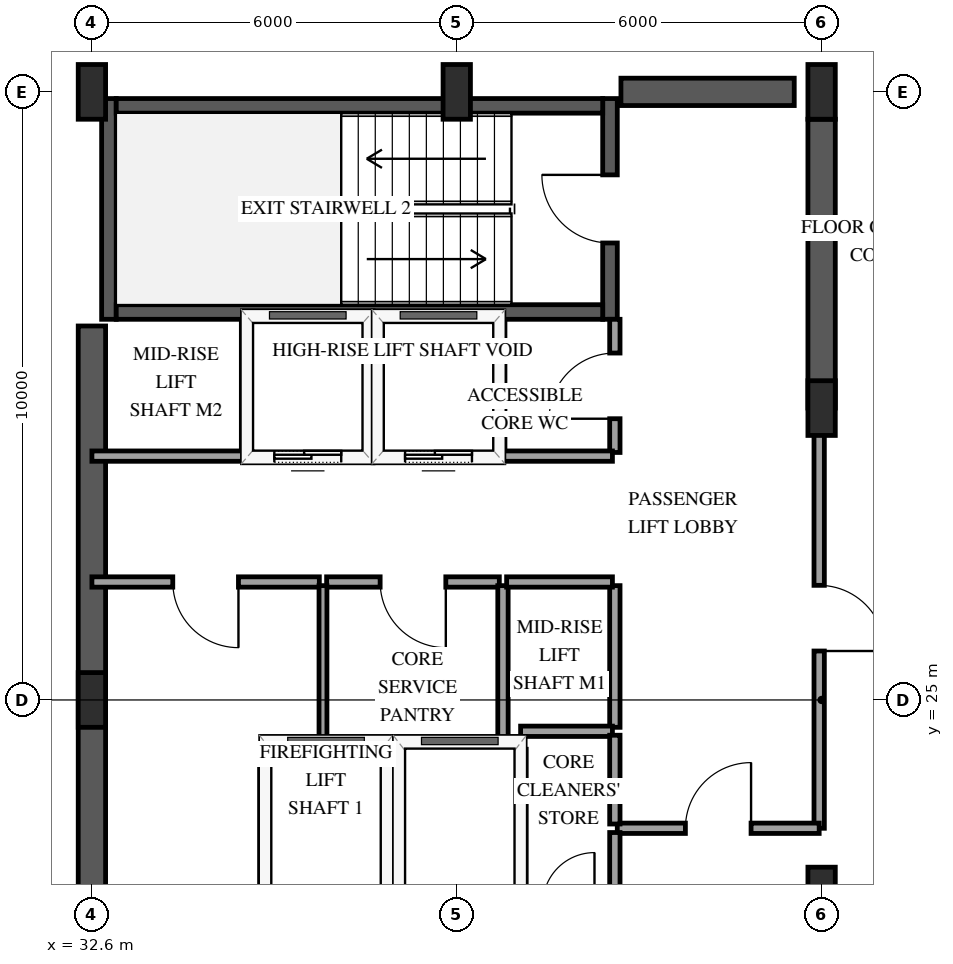
"""IFC4 building model, lengths in metres.
Left out: names, types, materials, properties, quantities, classifications, styles, units other than length and angle.
Written with IfcOpenShell. Run it as: python <this file> out.ifc"""

import sys

from ifc_helpers import new_model, si_unit, direction, frame, frame_2d, origin, origin_2d, place, context, subcontext, project, spatial, rectangle, extrude, element, fill, save


model = new_model("IFC4")
c1 = context("Model", 3, precision=1e-05, world=origin(), true_north=direction((0.0, 1.0)))
c2 = subcontext(c1, "Body", "Model", "MODEL_VIEW")
j1 = project(units=[si_unit("LENGTHUNIT", "METRE"), si_unit("PLANEANGLEUNIT", "RADIAN")], contexts=[c1])
p1 = place(None, origin())
s1 = spatial("IfcSite", under=j1, at=p1, CompositionType="ELEMENT")
p2 = place(p1, origin())
s2 = spatial("IfcBuilding", under=s1, at=p2, CompositionType="ELEMENT")
p3 = place(p2, frame((0.0, 0.0, 242.5)))
s3 = spatial("IfcBuildingStorey", under=s2, at=p3, CompositionType="ELEMENT", Elevation=242.5)
p4 = place(p3, frame((32.88, 31.26, 0.0), z_axis=(0.0, 0.0, 1.0), x_axis=(0.0, 1.0, 0.0)))
e1 = element("IfcWall", 1, at=p4, inside=s3, PredefinedType="SHEAR", context=c2, shape_type="SweptSolid", body=[
    extrude(rectangle(XDim=3.63, YDim=0.24, at=frame_2d((1.815, 0.0))), origin(), (0.0, 0.0, 1.0), 3.75),
])
p5 = place(p3, frame((41.12, 31.26, 0.0), z_axis=(0.0, 0.0, 1.0), x_axis=(0.0, 1.0, 0.0)))
e2 = element("IfcWall", 2, at=p5, inside=s3, PredefinedType="SHEAR", context=c2, shape_type="SweptSolid", body=[
    extrude(rectangle(XDim=3.63, YDim=0.24, at=frame_2d((1.815, 0.0))), origin(), (0.0, 0.0, 1.0), 3.75),
])
p6 = place(p5, frame((1.255, 0.0, 0.0)))
e3 = element("IfcOpeningElement", 3, at=p6, cuts=e2, PredefinedType="OPENING", context=c2, shape_type="SweptSolid", body=[
    extrude(rectangle(XDim=1.12, YDim=2.15, at=frame_2d((0.56, 1.075))), frame((0.0, 0.13, 0.0), z_axis=(0.0, -1.0, 0.0), x_axis=(1.0, 0.0, 0.0)), (0.0, 0.0, 1.0), 0.26),
])
for number, where, z_axis, x_axis in (
    (4, (33.0, 31.38, 0.0), (0.0, 0.0, 1.0), (1.0, 0.0, 0.0)),
    (5, (33.0, 34.77, 0.0), (0.0, 0.0, 1.0), (1.0, 0.0, 0.0)),
):
    element("IfcWall", number, at=place(p3, frame(where, z_axis=z_axis, x_axis=x_axis)), inside=s3, PredefinedType="SHEAR", context=c2, shape_type="SweptSolid", body=[
        extrude(rectangle(XDim=8.0, YDim=0.24, at=frame_2d((4.0, 0.0))), origin(), (0.0, 0.0, 1.0), 3.75),
    ])
p7 = place(p3, frame((32.6, 18.85, 0.0), z_axis=(0.0, 0.0, 1.0), x_axis=(0.0, 1.0, 0.0)))
e6 = element("IfcWall", 6, at=p7, inside=s3, PredefinedType="SHEAR", context=c2, shape_type="SweptSolid", body=[
    extrude(rectangle(XDim=12.3, YDim=0.45, at=frame_2d((6.15, 0.0))), origin(), (0.0, 0.0, 1.0), 3.75),
])
p8 = place(p3, frame((41.3, 35.0, 0.0), z_axis=(0.0, 0.0, 1.0), x_axis=(1.0, 0.0, 0.0)))
e7 = element("IfcWall", 7, at=p8, inside=s3, PredefinedType="SHEAR", context=c2, shape_type="SweptSolid", body=[
    extrude(rectangle(XDim=2.85, YDim=0.45, at=frame_2d((1.425, 0.0))), origin(), (0.0, 0.0, 1.0), 3.75),
])
p9 = place(p3, frame((44.6, 29.8, 0.0), z_axis=(0.0, 0.0, 1.0), x_axis=(0.0, 1.0, 0.0)))
e8 = element("IfcWall", 8, at=p9, inside=s3, PredefinedType="SHEAR", context=c2, shape_type="SweptSolid", body=[
    extrude(rectangle(XDim=4.75, YDim=0.45, at=frame_2d((2.375, 0.0))), origin(), (0.0, 0.0, 1.0), 3.75),
])
for number, where, z_axis, x_axis in (
    (9, (32.6, 25.0, -0.3), (0.0, 0.0, 1.0), (1.0, 0.0, 0.0)),
    (10, (32.6, 35.0, -0.3), (0.0, 0.0, 1.0), (1.0, 0.0, 0.0)),
    (11, (38.6, 35.0, -0.3), (0.0, 0.0, 1.0), (1.0, 0.0, 0.0)),
    (12, (44.6, 21.8, -0.3), (0.0, 0.0, 1.0), (1.0, 0.0, 0.0)),
    (13, (44.6, 29.8, -0.3), (0.0, 0.0, 1.0), (1.0, 0.0, 0.0)),
    (14, (44.6, 35.0, -0.3), (0.0, 0.0, 1.0), (1.0, 0.0, 0.0)),
):
    element("IfcColumn", number, at=place(p3, frame(where, z_axis=z_axis, x_axis=x_axis)), inside=s3, PredefinedType="PILASTER", context=c2, shape_type="SweptSolid", body=[
        extrude(rectangle(XDim=0.45, YDim=0.9, at=origin_2d()), origin(), (0.0, 0.0, 1.0), 4.05),
    ])
p10 = place(p3, frame((35.45, 24.3, 0.0), z_axis=(0.0, 0.0, 1.0), x_axis=(1.0, 0.0, 0.0)))
e15 = element("IfcWall", 15, at=p10, inside=s3, PredefinedType="SOLIDWALL", context=c2, shape_type="SweptSolid", body=[
    extrude(rectangle(XDim=2.0, YDim=0.185, at=frame_2d((1.0, 0.0))), origin(), (0.0, 0.0, 1.0), 3.45),
])
for number, where, z_axis, x_axis in (
    (16, (35.45, 21.81, 0.0), (0.0, 0.0, 1.0), (0.0, 1.0, 0.0)),
    (17, (37.45, 21.81, 0.0), (0.0, 0.0, 1.0), (0.0, 1.0, 0.0)),
):
    element("IfcWall", number, at=place(p3, frame(where, z_axis=z_axis, x_axis=x_axis)), inside=s3, PredefinedType="SOLIDWALL", context=c2, shape_type="SweptSolid", body=[
        extrude(rectangle(XDim=2.38, YDim=0.185, at=frame_2d((1.19, 0.0))), origin(), (0.0, 0.0, 1.0), 3.45),
    ])
p11 = place(p3, frame((37.65, 24.3, 0.0), z_axis=(0.0, 0.0, 1.0), x_axis=(1.0, 0.0, 0.0)))
e18 = element("IfcWall", 18, at=p11, inside=s3, PredefinedType="SOLIDWALL", context=c2, shape_type="SweptSolid", body=[
    extrude(rectangle(XDim=2.0, YDim=0.185, at=frame_2d((1.0, 0.0))), origin(), (0.0, 0.0, 1.0), 3.45),
])
p12 = place(p3, frame((39.65, 21.81, 0.0), z_axis=(0.0, 0.0, 1.0), x_axis=(0.0, 1.0, 0.0)))
e19 = element("IfcWall", 19, at=p12, inside=s3, PredefinedType="SOLIDWALL", context=c2, shape_type="SweptSolid", body=[
    extrude(rectangle(XDim=2.38, YDim=0.185, at=frame_2d((1.19, 0.0))), origin(), (0.0, 0.0, 1.0), 3.45),
])
p13 = place(p3, frame((35.15, 29.0, 0.0), z_axis=(0.0, 0.0, 1.0), x_axis=(1.0, 0.0, 0.0)))
e20 = element("IfcWall", 20, at=p13, inside=s3, PredefinedType="SOLIDWALL", context=c2, shape_type="SweptSolid", body=[
    extrude(rectangle(XDim=2.0, YDim=0.185, at=frame_2d((1.0, 0.0))), origin(), (0.0, 0.0, 1.0), 3.45),
])
p14 = place(p13, frame((0.45, 0.0, 0.0)))
e21 = element("IfcOpeningElement", 21, at=p14, cuts=e20, PredefinedType="OPENING", context=c2, shape_type="SweptSolid", body=[
    extrude(rectangle(XDim=1.1, YDim=2.15, at=frame_2d((0.55, 1.075))), frame((0.0, 0.103, 0.0), z_axis=(0.0, -1.0, 0.0), x_axis=(1.0, 0.0, 0.0)), (0.0, 0.0, 1.0), 0.205),
])
for number, where, z_axis, x_axis in (
    (22, (35.15, 29.11, 0.0), (0.0, 0.0, 1.0), (0.0, 1.0, 0.0)),
    (23, (37.15, 29.11, 0.0), (0.0, 0.0, 1.0), (0.0, 1.0, 0.0)),
):
    element("IfcWall", number, at=place(p3, frame(where, z_axis=z_axis, x_axis=x_axis)), inside=s3, PredefinedType="SOLIDWALL", context=c2, shape_type="SweptSolid", body=[
        extrude(rectangle(XDim=2.1, YDim=0.185, at=frame_2d((1.05, 0.0))), origin(), (0.0, 0.0, 1.0), 3.45),
    ])
p15 = place(p3, frame((37.3, 29.0, 0.0), z_axis=(0.0, 0.0, 1.0), x_axis=(1.0, 0.0, 0.0)))
e24 = element("IfcWall", 24, at=p15, inside=s3, PredefinedType="SOLIDWALL", context=c2, shape_type="SweptSolid", body=[
    extrude(rectangle(XDim=2.0, YDim=0.185, at=frame_2d((1.0, 0.0))), origin(), (0.0, 0.0, 1.0), 3.45),
])
p16 = place(p15, frame((0.45, 0.0, 0.0)))
e25 = element("IfcOpeningElement", 25, at=p16, cuts=e24, PredefinedType="OPENING", context=c2, shape_type="SweptSolid", body=[
    extrude(rectangle(XDim=1.1, YDim=2.15, at=frame_2d((0.55, 1.075))), frame((0.0, 0.103, 0.0), z_axis=(0.0, -1.0, 0.0), x_axis=(1.0, 0.0, 0.0)), (0.0, 0.0, 1.0), 0.205),
])
p17 = place(p3, frame((39.3, 29.11, 0.0), z_axis=(0.0, 0.0, 1.0), x_axis=(0.0, 1.0, 0.0)))
e26 = element("IfcWall", 26, at=p17, inside=s3, PredefinedType="SOLIDWALL", context=c2, shape_type="SweptSolid", body=[
    extrude(rectangle(XDim=2.1, YDim=0.185, at=frame_2d((1.05, 0.0))), origin(), (0.0, 0.0, 1.0), 3.45),
])
p18 = place(p3, frame((44.56, 29.8, 0.0), z_axis=(0.0, 0.0, 1.0), x_axis=(0.0, -1.0, 0.0)))
e27 = element("IfcWall", 27, at=p18, inside=s3, PredefinedType="PARTITIONING", context=c2, shape_type="SweptSolid", body=[
    extrude(rectangle(XDim=6.91, YDim=0.17, at=frame_2d((3.455, 0.0))), origin(), (0.0, 0.0, 1.0), 2.49),
])
p19 = place(p18, frame((2.915, 0.0, 0.0)))
e28 = element("IfcOpeningElement", 28, at=p19, cuts=e27, PredefinedType="OPENING", context=c2, shape_type="SweptSolid", body=[
    extrude(rectangle(XDim=1.08, YDim=2.15, at=frame_2d((0.54, 1.075))), frame((0.0, 0.095, 0.0), z_axis=(0.0, -1.0, 0.0), x_axis=(1.0, 0.0, 0.0)), (0.0, 0.0, 1.0), 0.19),
])
p20 = place(p3, frame((36.34, 26.94, 0.0), z_axis=(0.0, 0.0, 1.0), x_axis=(-1.0, 0.0, 0.0)))
e29 = element("IfcWall", 29, at=p20, inside=s3, PredefinedType="PARTITIONING", context=c2, shape_type="SweptSolid", body=[
    extrude(rectangle(XDim=3.74, YDim=0.17, at=frame_2d((1.87, 0.0))), origin(), (0.0, 0.0, 1.0), 3.45),
])
p21 = place(p20, frame((1.33, 0.0, 0.0)))
e30 = element("IfcOpeningElement", 30, at=p21, cuts=e29, PredefinedType="OPENING", context=c2, shape_type="SweptSolid", body=[
    extrude(rectangle(XDim=1.08, YDim=2.15, at=frame_2d((0.54, 1.075))), frame((0.0, 0.095, 0.0), z_axis=(0.0, -1.0, 0.0), x_axis=(1.0, 0.0, 0.0)), (0.0, 0.0, 1.0), 0.19),
])
p22 = place(p3, frame((41.24, 22.89, 0.0), z_axis=(0.0, 0.0, 1.0), x_axis=(1.0, 0.0, 0.0)))
e31 = element("IfcWall", 31, at=p22, inside=s3, PredefinedType="PARTITIONING", context=c2, shape_type="SweptSolid", body=[
    extrude(rectangle(XDim=3.32, YDim=0.17, at=frame_2d((1.66, 0.0))), origin(), (0.0, 0.0, 1.0), 3.45),
])
p23 = place(p22, frame((1.12, 0.0, 0.0)))
e32 = element("IfcOpeningElement", 32, at=p23, cuts=e31, PredefinedType="OPENING", context=c2, shape_type="SweptSolid", body=[
    extrude(rectangle(XDim=1.08, YDim=2.15, at=frame_2d((0.54, 1.075))), frame((0.0, 0.095, 0.0), z_axis=(0.0, -1.0, 0.0), x_axis=(1.0, 0.0, 0.0)), (0.0, 0.0, 1.0), 0.19),
])
p24 = place(p3, frame((39.3, 26.94, 0.0), z_axis=(0.0, 0.0, 1.0), x_axis=(-1.0, 0.0, 0.0)))
e33 = element("IfcWall", 33, at=p24, inside=s3, PredefinedType="PARTITIONING", context=c2, shape_type="SweptSolid", body=[
    extrude(rectangle(XDim=2.84, YDim=0.17, at=frame_2d((1.42, 0.0))), origin(), (0.0, 0.0, 1.0), 3.45),
])
p25 = place(p24, frame((0.88, 0.0, 0.0)))
e34 = element("IfcOpeningElement", 34, at=p25, cuts=e33, PredefinedType="OPENING", context=c2, shape_type="SweptSolid", body=[
    extrude(rectangle(XDim=1.08, YDim=2.15, at=frame_2d((0.54, 1.075))), frame((0.0, 0.095, 0.0), z_axis=(0.0, -1.0, 0.0), x_axis=(1.0, 0.0, 0.0)), (0.0, 0.0, 1.0), 0.19),
])
p26 = place(p3, frame((36.4, 26.88, 0.0), z_axis=(0.0, 0.0, 1.0), x_axis=(0.0, -1.0, 0.0)))
e35 = element("IfcWall", 35, at=p26, inside=s3, PredefinedType="PARTITIONING", context=c2, shape_type="SweptSolid", body=[
    extrude(rectangle(XDim=2.58, YDim=0.13, at=frame_2d((1.29, 0.0))), origin(), (0.0, 0.0, 1.0), 3.45),
])
p27 = place(p3, frame((39.36, 24.3, 0.0), z_axis=(0.0, 0.0, 1.0), x_axis=(0.0, 1.0, 0.0)))
e36 = element("IfcWall", 36, at=p27, inside=s3, PredefinedType="PARTITIONING", context=c2, shape_type="SweptSolid", body=[
    extrude(rectangle(XDim=2.58, YDim=0.17, at=frame_2d((1.29, 0.0))), origin(), (0.0, 0.0, 1.0), 3.45),
])
p28 = place(p3, frame((32.6, 29.01, 0.0), z_axis=(0.0, 0.0, 1.0), x_axis=(1.0, 0.0, 0.0)))
e37 = element("IfcWall", 37, at=p28, inside=s3, PredefinedType="PARTITIONING", context=c2, shape_type="SweptSolid", body=[
    extrude(rectangle(XDim=2.55, YDim=0.17, at=frame_2d((1.275, 0.0))), origin(), (0.0, 0.0, 1.0), 3.45),
])
p29 = place(p3, frame((41.2, 24.55, 0.0), z_axis=(0.0, 0.0, 1.0), x_axis=(0.0, 1.0, 0.0)))
e38 = element("IfcWall", 38, at=p29, inside=s3, PredefinedType="PARTITIONING", context=c2, shape_type="SweptSolid", body=[
    extrude(rectangle(XDim=2.33, YDim=0.17, at=frame_2d((1.165, 0.0))), origin(), (0.0, 0.0, 1.0), 3.45),
])
p30 = place(p3, frame((41.2, 29.07, 0.0), z_axis=(0.0, 0.0, 1.0), x_axis=(0.0, 1.0, 0.0)))
e39 = element("IfcWall", 39, at=p30, inside=s3, PredefinedType="PARTITIONING", context=c2, shape_type="SweptSolid", body=[
    extrude(rectangle(XDim=2.19, YDim=0.17, at=frame_2d((1.095, 0.0))), origin(), (0.0, 0.0, 1.0), 3.45),
])
p31 = place(p30, frame((0.555, 0.0, 0.0)))
e40 = element("IfcOpeningElement", 40, at=p31, cuts=e39, PredefinedType="OPENING", context=c2, shape_type="SweptSolid", body=[
    extrude(rectangle(XDim=1.08, YDim=2.15, at=frame_2d((0.54, 1.075))), frame((0.0, 0.095, 0.0), z_axis=(0.0, -1.0, 0.0), x_axis=(1.0, 0.0, 0.0)), (0.0, 0.0, 1.0), 0.19),
])
p32 = place(p3, frame((39.3, 29.01, 0.0), z_axis=(0.0, 0.0, 1.0), x_axis=(1.0, 0.0, 0.0)))
e41 = element("IfcWall", 41, at=p32, inside=s3, PredefinedType="PARTITIONING", context=c2, shape_type="SweptSolid", body=[
    extrude(rectangle(XDim=1.86, YDim=0.17, at=frame_2d((0.93, 0.0))), origin(), (0.0, 0.0, 1.0), 3.45),
])
p33 = place(p3, frame((41.16, 26.94, 0.0), z_axis=(0.0, 0.0, 1.0), x_axis=(-1.0, 0.0, 0.0)))
e42 = element("IfcWall", 42, at=p33, inside=s3, PredefinedType="PARTITIONING", context=c2, shape_type="SweptSolid", body=[
    extrude(rectangle(XDim=1.74, YDim=0.17, at=frame_2d((0.87, 0.0))), origin(), (0.0, 0.0, 1.0), 3.45),
])
p34 = place(p3, frame((39.65, 24.485, 0.0), z_axis=(0.0, 0.0, 1.0), x_axis=(1.0, 0.0, 0.0)))
e43 = element("IfcWall", 43, at=p34, inside=s3, PredefinedType="PARTITIONING", context=c2, shape_type="SweptSolid", body=[
    extrude(rectangle(XDim=1.51, YDim=0.17, at=frame_2d((0.755, 0.0))), origin(), (0.0, 0.0, 1.0), 3.45),
])
p35 = place(p3, frame((41.2, 22.96, 0.0), z_axis=(0.0, 0.0, 1.0), x_axis=(0.0, 1.0, 0.0)))
e44 = element("IfcWall", 44, at=p35, inside=s3, PredefinedType="PARTITIONING", context=c2, shape_type="SweptSolid", body=[
    extrude(rectangle(XDim=1.46, YDim=0.17, at=frame_2d((0.73, 0.0))), origin(), (0.0, 0.0, 1.0), 3.45),
])
p36 = place(p3, frame((41.2, 21.7, 0.0), z_axis=(0.0, 0.0, 1.0), x_axis=(0.0, 1.0, 0.0)))
e45 = element("IfcWall", 45, at=p36, inside=s3, PredefinedType="PARTITIONING", context=c2, shape_type="SweptSolid", body=[
    extrude(rectangle(XDim=1.12, YDim=0.17, at=frame_2d((0.56, 0.0))), origin(), (0.0, 0.0, 1.0), 3.45),
])
p37 = place(p14, origin())
e46 = element("IfcDoor", 46, at=p37, inside=s3, OperationType="SLIDING_TO_LEFT", PredefinedType="DOOR", context=c2, shape_type="SweptSolid", body=[
    extrude(rectangle(XDim=1.1, YDim=2.15, at=frame_2d((0.55, 1.075))), frame((0.0, 0.025, 0.0), z_axis=(0.0, -1.0, 0.0), x_axis=(1.0, 0.0, 0.0)), (0.0, 0.0, 1.0), 0.05),
])
fill(e21, e46)
p38 = place(p16, origin())
e47 = element("IfcDoor", 47, at=p38, inside=s3, OperationType="SLIDING_TO_LEFT", PredefinedType="DOOR", context=c2, shape_type="SweptSolid", body=[
    extrude(rectangle(XDim=1.1, YDim=2.15, at=frame_2d((0.55, 1.075))), frame((0.0, 0.025, 0.0), z_axis=(0.0, -1.0, 0.0), x_axis=(1.0, 0.0, 0.0)), (0.0, 0.0, 1.0), 0.05),
])
fill(e25, e47)
p39 = place(p6, origin())
e48 = element("IfcDoor", 48, at=p39, inside=s3, OperationType="SINGLE_SWING_RIGHT", PredefinedType="DOOR", context=c2, shape_type="SweptSolid", body=[
    extrude(rectangle(XDim=1.12, YDim=2.15, at=frame_2d((0.56, 1.075))), frame((0.0, 0.025, 0.0), z_axis=(0.0, -1.0, 0.0), x_axis=(1.0, 0.0, 0.0)), (0.0, 0.0, 1.0), 0.05),
])
fill(e3, e48)
p40 = place(p19, origin())
e49 = element("IfcDoor", 49, at=p40, inside=s3, OperationType="SINGLE_SWING_RIGHT", PredefinedType="DOOR", context=c2, shape_type="SweptSolid", body=[
    extrude(rectangle(XDim=1.08, YDim=2.15, at=frame_2d((0.54, 1.075))), frame((0.0, 0.025, 0.0), z_axis=(0.0, -1.0, 0.0), x_axis=(1.0, 0.0, 0.0)), (0.0, 0.0, 1.0), 0.05),
])
fill(e28, e49)
p41 = place(p21, origin())
e50 = element("IfcDoor", 50, at=p41, inside=s3, OperationType="SINGLE_SWING_LEFT", PredefinedType="DOOR", context=c2, shape_type="SweptSolid", body=[
    extrude(rectangle(XDim=1.08, YDim=2.15, at=frame_2d((0.54, 1.075))), frame((0.0, 0.025, 0.0), z_axis=(0.0, -1.0, 0.0), x_axis=(1.0, 0.0, 0.0)), (0.0, 0.0, 1.0), 0.05),
])
fill(e30, e50)
p42 = place(p23, origin())
e51 = element("IfcDoor", 51, at=p42, inside=s3, OperationType="SINGLE_SWING_RIGHT", PredefinedType="DOOR", context=c2, shape_type="SweptSolid", body=[
    extrude(rectangle(XDim=1.08, YDim=2.15, at=frame_2d((0.54, 1.075))), frame((0.0, 0.025, 0.0), z_axis=(0.0, -1.0, 0.0), x_axis=(1.0, 0.0, 0.0)), (0.0, 0.0, 1.0), 0.05),
])
fill(e32, e51)
p43 = place(p25, origin())
e52 = element("IfcDoor", 52, at=p43, inside=s3, OperationType="SINGLE_SWING_LEFT", PredefinedType="DOOR", context=c2, shape_type="SweptSolid", body=[
    extrude(rectangle(XDim=1.08, YDim=2.15, at=frame_2d((0.54, 1.075))), frame((0.0, 0.025, 0.0), z_axis=(0.0, -1.0, 0.0), x_axis=(1.0, 0.0, 0.0)), (0.0, 0.0, 1.0), 0.05),
])
fill(e34, e52)
p44 = place(p31, origin())
e53 = element("IfcDoor", 53, at=p44, inside=s3, OperationType="SINGLE_SWING_LEFT", PredefinedType="DOOR", context=c2, shape_type="SweptSolid", body=[
    extrude(rectangle(XDim=1.08, YDim=2.15, at=frame_2d((0.54, 1.075))), frame((0.0, 0.025, 0.0), z_axis=(0.0, -1.0, 0.0), x_axis=(1.0, 0.0, 0.0)), (0.0, 0.0, 1.0), 0.05),
])
fill(e40, e53)
save(model, sys.argv[1])
